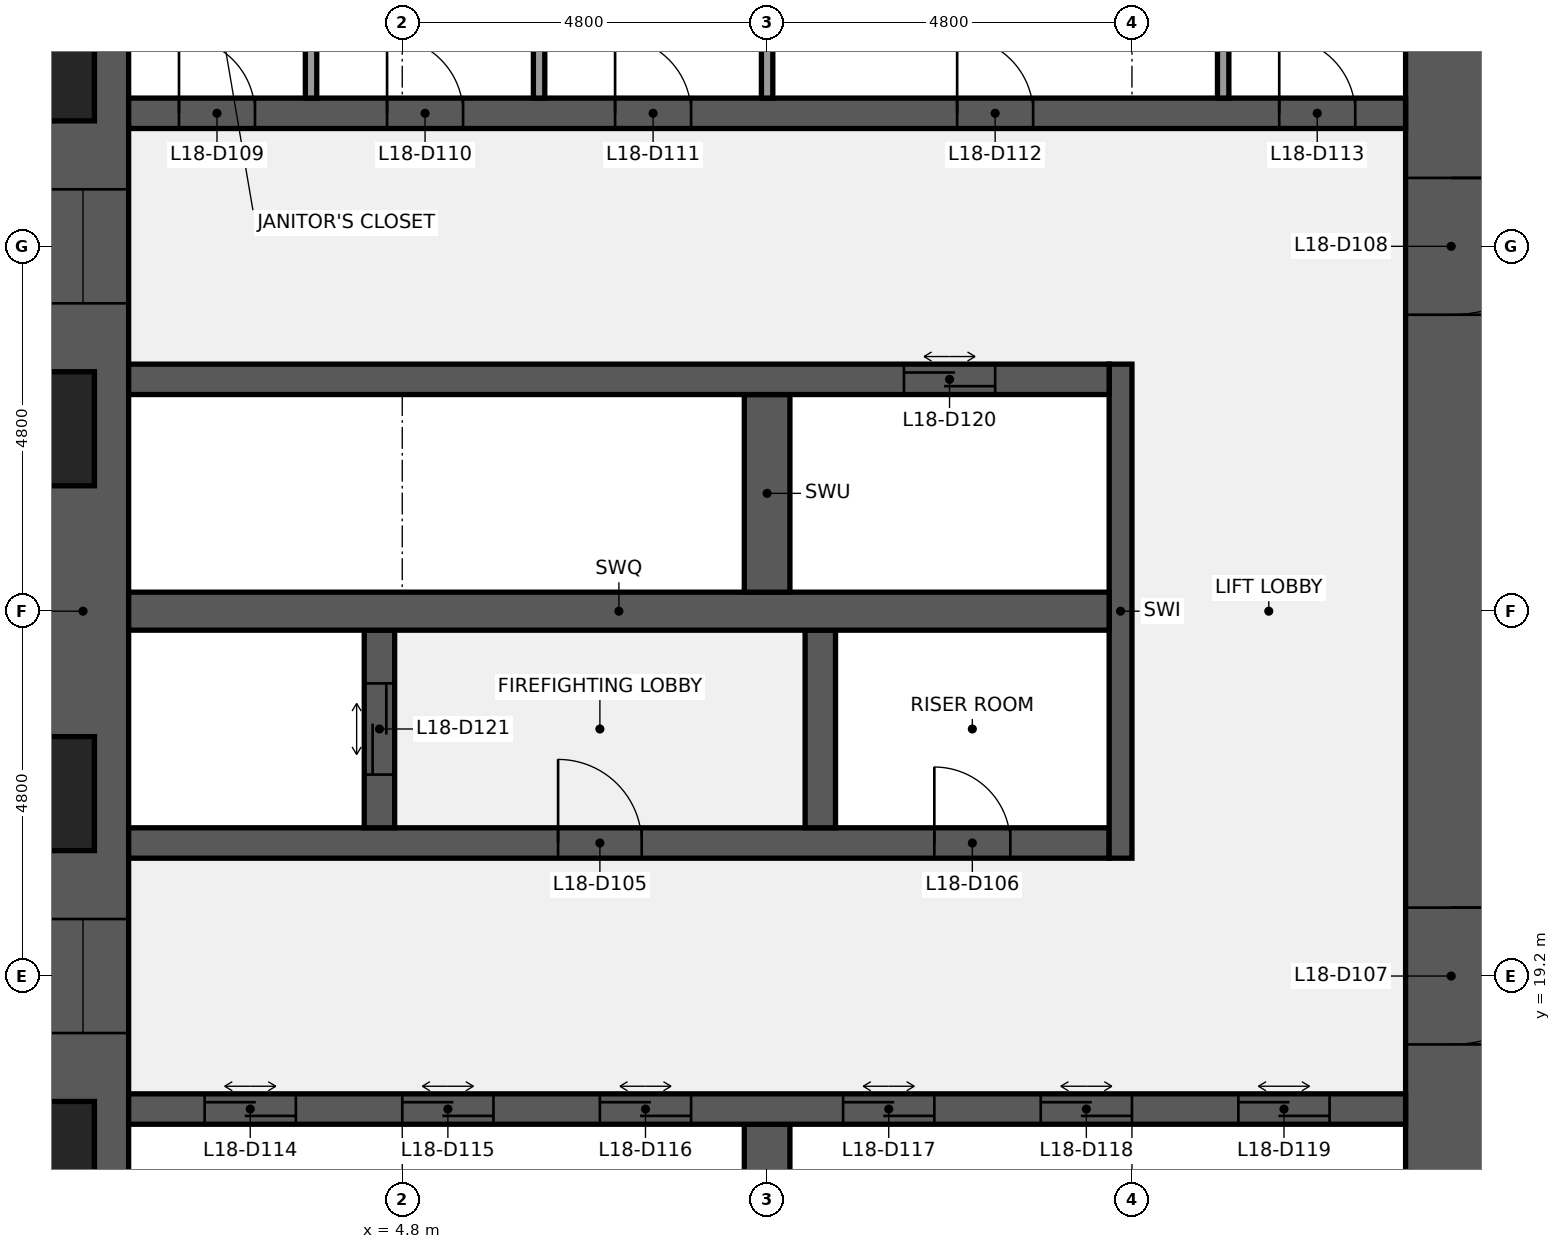
"""IFC4 building model, lengths in metres.
Left out: names, types, materials, properties, quantities, classifications, styles, units other than length and angle.
Written with IfcOpenShell. Run it as: python <this file> out.ifc"""

import sys

from ifc_helpers import new_model, si_unit, direction, frame, frame_2d, origin, place, context, subcontext, project, spatial, rectangle, extrude, element, fill, save


model = new_model("IFC4")
c1 = context("Model", 3, precision=1e-05, world=origin(), true_north=direction((0.0, 1.0)))
c2 = subcontext(c1, "Body", "Model", "MODEL_VIEW")
j1 = project(units=[si_unit("LENGTHUNIT", "METRE"), si_unit("PLANEANGLEUNIT", "RADIAN")], contexts=[c1])
p1 = place(None, origin())
s1 = spatial("IfcSite", under=j1, at=p1, CompositionType="ELEMENT")
p2 = place(p1, origin())
s2 = spatial("IfcBuilding", under=s1, at=p2, CompositionType="ELEMENT")
p3 = place(p2, frame((0.0, 0.0, 83.0)))
s3 = spatial("IfcBuildingStorey", under=s2, at=p3, CompositionType="ELEMENT", Elevation=83.0)
p4 = place(p3, frame((0.6, 9.6, 0.0), z_axis=(0.0, 0.0, 1.0), x_axis=(0.0, 1.0, 0.0)))
e1 = element("IfcWall", 1, at=p4, inside=s3, PredefinedType="SHEAR", context=c2, shape_type="SweptSolid", body=[
    extrude(rectangle(XDim=28.8, YDim=1.2, at=frame_2d((14.4, 0.0))), origin(), (0.0, 0.0, 1.0), 3.7),
])
p5 = place(p4, frame((8.85, 0.0, 0.9)))
e2 = element("IfcOpeningElement", 2, at=p5, cuts=e1, PredefinedType="OPENING", context=c2, shape_type="SweptSolid", body=[
    extrude(rectangle(XDim=1.5, YDim=1.5, at=frame_2d((0.75, 0.75))), frame((0.0, 0.61, 0.0), z_axis=(0.0, -1.0, 0.0), x_axis=(1.0, 0.0, 0.0)), (0.0, 0.0, 1.0), 1.22),
])
p6 = place(p4, frame((18.45, 0.0, 0.9)))
e3 = element("IfcOpeningElement", 3, at=p6, cuts=e1, PredefinedType="OPENING", context=c2, shape_type="SweptSolid", body=[
    extrude(rectangle(XDim=1.5, YDim=1.5, at=frame_2d((0.75, 0.75))), frame((0.0, 0.61, 0.0), z_axis=(0.0, -1.0, 0.0), x_axis=(1.0, 0.0, 0.0)), (0.0, 0.0, 1.0), 1.22),
])
p7 = place(p3, frame((18.6, 38.4, 0.0), z_axis=(0.0, 0.0, 1.0), x_axis=(0.0, -1.0, 0.0)))
e4 = element("IfcWall", 4, at=p7, inside=s3, PredefinedType="SHEAR", context=c2, shape_type="SweptSolid", body=[
    extrude(rectangle(XDim=28.8, YDim=1.2, at=frame_2d((14.4, 0.0))), origin(), (0.0, 0.0, 1.0), 3.7),
])
p8 = place(p7, frame((18.3, 0.0, 0.0)))
e5 = element("IfcOpeningElement", 5, at=p8, cuts=e4, PredefinedType="OPENING", context=c2, shape_type="SweptSolid", body=[
    extrude(rectangle(XDim=1.8, YDim=2.1, at=frame_2d((0.9, 1.05))), frame((0.0, 0.61, 0.0), z_axis=(0.0, -1.0, 0.0), x_axis=(1.0, 0.0, 0.0)), (0.0, 0.0, 1.0), 1.22),
])
p9 = place(p7, frame((8.7, 0.0, 0.0)))
e6 = element("IfcOpeningElement", 6, at=p9, cuts=e4, PredefinedType="OPENING", context=c2, shape_type="SweptSolid", body=[
    extrude(rectangle(XDim=1.8, YDim=2.1, at=frame_2d((0.9, 1.05))), frame((0.0, 0.61, 0.0), z_axis=(0.0, -1.0, 0.0), x_axis=(1.0, 0.0, 0.0)), (0.0, 0.0, 1.0), 1.22),
])
p10 = place(p3, frame((9.6, 14.65, 0.0), z_axis=(0.0, 0.0, 1.0), x_axis=(0.0, 1.0, 0.0)))
e7 = element("IfcWall", 7, at=p10, inside=s3, PredefinedType="SHEAR", context=c2, shape_type="SweptSolid", body=[
    extrude(rectangle(XDim=2.6, YDim=0.6, at=frame_2d((1.3, 0.0))), origin(), (0.0, 0.0, 1.0), 3.7),
])
p11 = place(p3, frame((1.2, 17.45, 0.0), z_axis=(0.0, 0.0, 1.0), x_axis=(1.0, 0.0, 0.0)))
e8 = element("IfcWall", 8, at=p11, inside=s3, PredefinedType="SHEAR", context=c2, shape_type="SweptSolid", body=[
    extrude(rectangle(XDim=16.8, YDim=0.4, at=frame_2d((8.4, 0.0))), origin(), (0.0, 0.0, 1.0), 3.7),
])
p12 = place(p11, frame((1.0, 0.0, 0.0)))
e9 = element("IfcOpeningElement", 9, at=p12, cuts=e8, PredefinedType="OPENING", context=c2, shape_type="SweptSolid", body=[
    extrude(rectangle(XDim=1.2, YDim=2.1, at=frame_2d((0.6, 1.05))), frame((0.0, 0.21, 0.0), z_axis=(0.0, -1.0, 0.0), x_axis=(1.0, 0.0, 0.0)), (0.0, 0.0, 1.0), 0.42),
])
p13 = place(p11, frame((3.6, 0.0, 0.0)))
e10 = element("IfcOpeningElement", 10, at=p13, cuts=e8, PredefinedType="OPENING", context=c2, shape_type="SweptSolid", body=[
    extrude(rectangle(XDim=1.2, YDim=2.1, at=frame_2d((0.6, 1.05))), frame((0.0, 0.21, 0.0), z_axis=(0.0, -1.0, 0.0), x_axis=(1.0, 0.0, 0.0)), (0.0, 0.0, 1.0), 0.42),
])
p14 = place(p11, frame((6.2, 0.0, 0.0)))
e11 = element("IfcOpeningElement", 11, at=p14, cuts=e8, PredefinedType="OPENING", context=c2, shape_type="SweptSolid", body=[
    extrude(rectangle(XDim=1.2, YDim=2.1, at=frame_2d((0.6, 1.05))), frame((0.0, 0.21, 0.0), z_axis=(0.0, -1.0, 0.0), x_axis=(1.0, 0.0, 0.0)), (0.0, 0.0, 1.0), 0.42),
])
p15 = place(p11, frame((9.4, 0.0, 0.0)))
e12 = element("IfcOpeningElement", 12, at=p15, cuts=e8, PredefinedType="OPENING", context=c2, shape_type="SweptSolid", body=[
    extrude(rectangle(XDim=1.2, YDim=2.1, at=frame_2d((0.6, 1.05))), frame((0.0, 0.21, 0.0), z_axis=(0.0, -1.0, 0.0), x_axis=(1.0, 0.0, 0.0)), (0.0, 0.0, 1.0), 0.42),
])
p16 = place(p11, frame((12.0, 0.0, 0.0)))
e13 = element("IfcOpeningElement", 13, at=p16, cuts=e8, PredefinedType="OPENING", context=c2, shape_type="SweptSolid", body=[
    extrude(rectangle(XDim=1.2, YDim=2.1, at=frame_2d((0.6, 1.05))), frame((0.0, 0.21, 0.0), z_axis=(0.0, -1.0, 0.0), x_axis=(1.0, 0.0, 0.0)), (0.0, 0.0, 1.0), 0.42),
])
p17 = place(p11, frame((14.6, 0.0, 0.0)))
e14 = element("IfcOpeningElement", 14, at=p17, cuts=e8, PredefinedType="OPENING", context=c2, shape_type="SweptSolid", body=[
    extrude(rectangle(XDim=1.2, YDim=2.1, at=frame_2d((0.6, 1.05))), frame((0.0, 0.21, 0.0), z_axis=(0.0, -1.0, 0.0), x_axis=(1.0, 0.0, 0.0)), (0.0, 0.0, 1.0), 0.42),
])
p18 = place(p3, frame((1.2, 20.95, 0.0), z_axis=(0.0, 0.0, 1.0), x_axis=(1.0, 0.0, 0.0)))
e15 = element("IfcWall", 15, at=p18, inside=s3, PredefinedType="SHEAR", context=c2, shape_type="SweptSolid", body=[
    extrude(rectangle(XDim=12.9, YDim=0.4, at=frame_2d((6.45, 0.0))), origin(), (0.0, 0.0, 1.0), 3.7),
])
p19 = place(p18, frame((5.65, 0.0, 0.0)))
e16 = element("IfcOpeningElement", 16, at=p19, cuts=e15, PredefinedType="OPENING", context=c2, shape_type="SweptSolid", body=[
    extrude(rectangle(XDim=1.1, YDim=2.1, at=frame_2d((0.55, 1.05))), frame((0.0, 0.21, 0.0), z_axis=(0.0, -1.0, 0.0), x_axis=(1.0, 0.0, 0.0)), (0.0, 0.0, 1.0), 0.42),
])
p20 = place(p18, frame((10.6, 0.0, 0.0)))
e17 = element("IfcOpeningElement", 17, at=p20, cuts=e15, PredefinedType="OPENING", context=c2, shape_type="SweptSolid", body=[
    extrude(rectangle(XDim=1.0, YDim=2.1, at=frame_2d((0.5, 1.05))), frame((0.0, 0.21, 0.0), z_axis=(0.0, -1.0, 0.0), x_axis=(1.0, 0.0, 0.0)), (0.0, 0.0, 1.0), 0.42),
])
p21 = place(p3, frame((14.25, 20.75, 0.0), z_axis=(0.0, 0.0, 1.0), x_axis=(0.0, 1.0, 0.0)))
e18 = element("IfcWall", 18, at=p21, inside=s3, PredefinedType="SHEAR", context=c2, shape_type="SweptSolid", body=[
    extrude(rectangle(XDim=6.5, YDim=0.3, at=frame_2d((3.25, 0.0))), origin(), (0.0, 0.0, 1.0), 3.7),
])
p22 = place(p3, frame((4.5, 21.15, 0.0), z_axis=(0.0, 0.0, 1.0), x_axis=(0.0, 1.0, 0.0)))
e19 = element("IfcWall", 19, at=p22, inside=s3, PredefinedType="SHEAR", context=c2, shape_type="SweptSolid", body=[
    extrude(rectangle(XDim=2.6, YDim=0.4, at=frame_2d((1.3, 0.0))), origin(), (0.0, 0.0, 1.0), 3.7),
])
p23 = place(p22, frame((0.7, 0.0, 0.0)))
e20 = element("IfcOpeningElement", 20, at=p23, cuts=e19, PredefinedType="OPENING", context=c2, shape_type="SweptSolid", body=[
    extrude(rectangle(XDim=1.2, YDim=2.1, at=frame_2d((0.6, 1.05))), frame((0.0, 0.21, 0.0), z_axis=(0.0, -1.0, 0.0), x_axis=(1.0, 0.0, 0.0)), (0.0, 0.0, 1.0), 0.42),
])
p24 = place(p3, frame((10.3, 21.15, 0.0), z_axis=(0.0, 0.0, 1.0), x_axis=(0.0, 1.0, 0.0)))
e21 = element("IfcWall", 21, at=p24, inside=s3, PredefinedType="SHEAR", context=c2, shape_type="SweptSolid", body=[
    extrude(rectangle(XDim=2.6, YDim=0.4, at=frame_2d((1.3, 0.0))), origin(), (0.0, 0.0, 1.0), 3.7),
])
p25 = place(p3, frame((1.2, 24.0, 0.0), z_axis=(0.0, 0.0, 1.0), x_axis=(1.0, 0.0, 0.0)))
e22 = element("IfcWall", 22, at=p25, inside=s3, PredefinedType="SHEAR", context=c2, shape_type="SweptSolid", body=[
    extrude(rectangle(XDim=12.9, YDim=0.5, at=frame_2d((6.45, 0.0))), origin(), (0.0, 0.0, 1.0), 3.7),
])
p26 = place(p3, frame((9.6, 24.25, 0.0), z_axis=(0.0, 0.0, 1.0), x_axis=(0.0, 1.0, 0.0)))
e23 = element("IfcWall", 23, at=p26, inside=s3, PredefinedType="SHEAR", context=c2, shape_type="SweptSolid", body=[
    extrude(rectangle(XDim=2.6, YDim=0.6, at=frame_2d((1.3, 0.0))), origin(), (0.0, 0.0, 1.0), 3.7),
])
p27 = place(p3, frame((1.2, 27.05, 0.0), z_axis=(0.0, 0.0, 1.0), x_axis=(1.0, 0.0, 0.0)))
e24 = element("IfcWall", 24, at=p27, inside=s3, PredefinedType="SHEAR", context=c2, shape_type="SweptSolid", body=[
    extrude(rectangle(XDim=12.9, YDim=0.4, at=frame_2d((6.45, 0.0))), origin(), (0.0, 0.0, 1.0), 3.7),
])
p28 = place(p27, frame((10.2, 0.0, 0.0)))
e25 = element("IfcOpeningElement", 25, at=p28, cuts=e24, PredefinedType="OPENING", context=c2, shape_type="SweptSolid", body=[
    extrude(rectangle(XDim=1.2, YDim=2.1, at=frame_2d((0.6, 1.05))), frame((0.0, 0.21, 0.0), z_axis=(0.0, -1.0, 0.0), x_axis=(1.0, 0.0, 0.0)), (0.0, 0.0, 1.0), 0.42),
])
p29 = place(p3, frame((1.2, 30.55, 0.0), z_axis=(0.0, 0.0, 1.0), x_axis=(1.0, 0.0, 0.0)))
e26 = element("IfcWall", 26, at=p29, inside=s3, PredefinedType="SHEAR", context=c2, shape_type="SweptSolid", body=[
    extrude(rectangle(XDim=16.8, YDim=0.4, at=frame_2d((8.4, 0.0))), origin(), (0.0, 0.0, 1.0), 3.7),
])
p30 = place(p29, frame((0.663, 0.0, 0.0)))
e27 = element("IfcOpeningElement", 27, at=p30, cuts=e26, PredefinedType="OPENING", context=c2, shape_type="SweptSolid", body=[
    extrude(rectangle(XDim=1.0, YDim=2.1, at=frame_2d((0.5, 1.05))), frame((0.0, 0.21, 0.0), z_axis=(0.0, -1.0, 0.0), x_axis=(1.0, 0.0, 0.0)), (0.0, 0.0, 1.0), 0.42),
])
p31 = place(p29, frame((3.4, 0.0, 0.0)))
e28 = element("IfcOpeningElement", 28, at=p31, cuts=e26, PredefinedType="OPENING", context=c2, shape_type="SweptSolid", body=[
    extrude(rectangle(XDim=1.0, YDim=2.1, at=frame_2d((0.5, 1.05))), frame((0.0, 0.21, 0.0), z_axis=(0.0, -1.0, 0.0), x_axis=(1.0, 0.0, 0.0)), (0.0, 0.0, 1.0), 0.42),
])
p32 = place(p29, frame((6.4, 0.0, 0.0)))
e29 = element("IfcOpeningElement", 29, at=p32, cuts=e26, PredefinedType="OPENING", context=c2, shape_type="SweptSolid", body=[
    extrude(rectangle(XDim=1.0, YDim=2.1, at=frame_2d((0.5, 1.05))), frame((0.0, 0.21, 0.0), z_axis=(0.0, -1.0, 0.0), x_axis=(1.0, 0.0, 0.0)), (0.0, 0.0, 1.0), 0.42),
])
p33 = place(p29, frame((10.9, 0.0, 0.0)))
e30 = element("IfcOpeningElement", 30, at=p33, cuts=e26, PredefinedType="OPENING", context=c2, shape_type="SweptSolid", body=[
    extrude(rectangle(XDim=1.0, YDim=2.1, at=frame_2d((0.5, 1.05))), frame((0.0, 0.21, 0.0), z_axis=(0.0, -1.0, 0.0), x_axis=(1.0, 0.0, 0.0)), (0.0, 0.0, 1.0), 0.42),
])
p34 = place(p29, frame((15.137, 0.0, 0.0)))
e31 = element("IfcOpeningElement", 31, at=p34, cuts=e26, PredefinedType="OPENING", context=c2, shape_type="SweptSolid", body=[
    extrude(rectangle(XDim=1.0, YDim=2.1, at=frame_2d((0.5, 1.05))), frame((0.0, 0.21, 0.0), z_axis=(0.0, -1.0, 0.0), x_axis=(1.0, 0.0, 0.0)), (0.0, 0.0, 1.0), 0.42),
])
for number, where, z_axis, x_axis in (
    (32, (3.6, 30.75, 0.0), (0.0, 0.0, 1.0), (0.0, 1.0, 0.0)),
    (33, (6.6, 30.75, 0.0), (0.0, 0.0, 1.0), (0.0, 1.0, 0.0)),
    (34, (9.6, 30.75, 0.0), (0.0, 0.0, 1.0), (0.0, 1.0, 0.0)),
    (35, (15.6, 30.75, 0.0), (0.0, 0.0, 1.0), (0.0, 1.0, 0.0)),
):
    element("IfcWall", number, at=place(p3, frame(where, z_axis=z_axis, x_axis=x_axis)), inside=s3, PredefinedType="PARTITIONING", context=c2, shape_type="SweptSolid", body=[
        extrude(rectangle(XDim=2.6, YDim=0.15, at=frame_2d((1.3, 0.0))), origin(), (0.0, 0.0, 1.0), 3.7),
    ])
p35 = place(p19, origin())
e36 = element("IfcDoor", 36, at=p35, inside=s3, OperationType="SINGLE_SWING_LEFT", PredefinedType="DOOR", context=c2, shape_type="SweptSolid", body=[
    extrude(rectangle(XDim=1.1, YDim=2.1, at=frame_2d((0.55, 1.05))), frame((0.0, 0.025, 0.0), z_axis=(0.0, -1.0, 0.0), x_axis=(1.0, 0.0, 0.0)), (0.0, 0.0, 1.0), 0.05),
])
fill(e16, e36)
p36 = place(p20, origin())
e37 = element("IfcDoor", 37, at=p36, inside=s3, OperationType="SINGLE_SWING_LEFT", PredefinedType="DOOR", context=c2, shape_type="SweptSolid", body=[
    extrude(rectangle(XDim=1.0, YDim=2.1, at=frame_2d((0.5, 1.05))), frame((0.0, 0.025, 0.0), z_axis=(0.0, -1.0, 0.0), x_axis=(1.0, 0.0, 0.0)), (0.0, 0.0, 1.0), 0.05),
])
fill(e17, e37)
p37 = place(p8, origin())
e38 = element("IfcDoor", 38, at=p37, inside=s3, OperationType="DOUBLE_DOOR_SINGLE_SWING", PredefinedType="DOOR", context=c2, shape_type="SweptSolid", body=[
    extrude(rectangle(XDim=1.8, YDim=2.1, at=frame_2d((0.9, 1.05))), frame((0.0, 0.025, 0.0), z_axis=(0.0, -1.0, 0.0), x_axis=(1.0, 0.0, 0.0)), (0.0, 0.0, 1.0), 0.05),
])
fill(e5, e38)
p38 = place(p9, origin())
e39 = element("IfcDoor", 39, at=p38, inside=s3, OperationType="DOUBLE_DOOR_SINGLE_SWING", PredefinedType="DOOR", context=c2, shape_type="SweptSolid", body=[
    extrude(rectangle(XDim=1.8, YDim=2.1, at=frame_2d((0.9, 1.05))), frame((0.0, 0.025, 0.0), z_axis=(0.0, -1.0, 0.0), x_axis=(1.0, 0.0, 0.0)), (0.0, 0.0, 1.0), 0.05),
])
fill(e6, e39)
p39 = place(p30, origin())
e40 = element("IfcDoor", 40, at=p39, inside=s3, OperationType="SINGLE_SWING_LEFT", PredefinedType="DOOR", context=c2, shape_type="SweptSolid", body=[
    extrude(rectangle(XDim=1.0, YDim=2.1, at=frame_2d((0.5, 1.05))), frame((0.0, 0.025, 0.0), z_axis=(0.0, -1.0, 0.0), x_axis=(1.0, 0.0, 0.0)), (0.0, 0.0, 1.0), 0.05),
])
fill(e27, e40)
p40 = place(p31, origin())
e41 = element("IfcDoor", 41, at=p40, inside=s3, OperationType="SINGLE_SWING_LEFT", PredefinedType="DOOR", context=c2, shape_type="SweptSolid", body=[
    extrude(rectangle(XDim=1.0, YDim=2.1, at=frame_2d((0.5, 1.05))), frame((0.0, 0.025, 0.0), z_axis=(0.0, -1.0, 0.0), x_axis=(1.0, 0.0, 0.0)), (0.0, 0.0, 1.0), 0.05),
])
fill(e28, e41)
p41 = place(p32, origin())
e42 = element("IfcDoor", 42, at=p41, inside=s3, OperationType="SINGLE_SWING_LEFT", PredefinedType="DOOR", context=c2, shape_type="SweptSolid", body=[
    extrude(rectangle(XDim=1.0, YDim=2.1, at=frame_2d((0.5, 1.05))), frame((0.0, 0.025, 0.0), z_axis=(0.0, -1.0, 0.0), x_axis=(1.0, 0.0, 0.0)), (0.0, 0.0, 1.0), 0.05),
])
fill(e29, e42)
p42 = place(p33, origin())
e43 = element("IfcDoor", 43, at=p42, inside=s3, OperationType="SINGLE_SWING_LEFT", PredefinedType="DOOR", context=c2, shape_type="SweptSolid", body=[
    extrude(rectangle(XDim=1.0, YDim=2.1, at=frame_2d((0.5, 1.05))), frame((0.0, 0.025, 0.0), z_axis=(0.0, -1.0, 0.0), x_axis=(1.0, 0.0, 0.0)), (0.0, 0.0, 1.0), 0.05),
])
fill(e30, e43)
p43 = place(p34, origin())
e44 = element("IfcDoor", 44, at=p43, inside=s3, OperationType="SINGLE_SWING_LEFT", PredefinedType="DOOR", context=c2, shape_type="SweptSolid", body=[
    extrude(rectangle(XDim=1.0, YDim=2.1, at=frame_2d((0.5, 1.05))), frame((0.0, 0.025, 0.0), z_axis=(0.0, -1.0, 0.0), x_axis=(1.0, 0.0, 0.0)), (0.0, 0.0, 1.0), 0.05),
])
fill(e31, e44)
p44 = place(p12, origin())
e45 = element("IfcDoor", 45, at=p44, inside=s3, OperationType="DOUBLE_DOOR_SLIDING", PredefinedType="DOOR", context=c2, shape_type="SweptSolid", body=[
    extrude(rectangle(XDim=1.2, YDim=2.1, at=frame_2d((0.6, 1.05))), frame((0.0, 0.025, 0.0), z_axis=(0.0, -1.0, 0.0), x_axis=(1.0, 0.0, 0.0)), (0.0, 0.0, 1.0), 0.05),
])
fill(e9, e45)
p45 = place(p13, origin())
e46 = element("IfcDoor", 46, at=p45, inside=s3, OperationType="DOUBLE_DOOR_SLIDING", PredefinedType="DOOR", context=c2, shape_type="SweptSolid", body=[
    extrude(rectangle(XDim=1.2, YDim=2.1, at=frame_2d((0.6, 1.05))), frame((0.0, 0.025, 0.0), z_axis=(0.0, -1.0, 0.0), x_axis=(1.0, 0.0, 0.0)), (0.0, 0.0, 1.0), 0.05),
])
fill(e10, e46)
p46 = place(p14, origin())
e47 = element("IfcDoor", 47, at=p46, inside=s3, OperationType="DOUBLE_DOOR_SLIDING", PredefinedType="DOOR", context=c2, shape_type="SweptSolid", body=[
    extrude(rectangle(XDim=1.2, YDim=2.1, at=frame_2d((0.6, 1.05))), frame((0.0, 0.025, 0.0), z_axis=(0.0, -1.0, 0.0), x_axis=(1.0, 0.0, 0.0)), (0.0, 0.0, 1.0), 0.05),
])
fill(e11, e47)
p47 = place(p15, origin())
e48 = element("IfcDoor", 48, at=p47, inside=s3, OperationType="DOUBLE_DOOR_SLIDING", PredefinedType="DOOR", context=c2, shape_type="SweptSolid", body=[
    extrude(rectangle(XDim=1.2, YDim=2.1, at=frame_2d((0.6, 1.05))), frame((0.0, 0.025, 0.0), z_axis=(0.0, -1.0, 0.0), x_axis=(1.0, 0.0, 0.0)), (0.0, 0.0, 1.0), 0.05),
])
fill(e12, e48)
p48 = place(p16, origin())
e49 = element("IfcDoor", 49, at=p48, inside=s3, OperationType="DOUBLE_DOOR_SLIDING", PredefinedType="DOOR", context=c2, shape_type="SweptSolid", body=[
    extrude(rectangle(XDim=1.2, YDim=2.1, at=frame_2d((0.6, 1.05))), frame((0.0, 0.025, 0.0), z_axis=(0.0, -1.0, 0.0), x_axis=(1.0, 0.0, 0.0)), (0.0, 0.0, 1.0), 0.05),
])
fill(e13, e49)
p49 = place(p17, origin())
e50 = element("IfcDoor", 50, at=p49, inside=s3, OperationType="DOUBLE_DOOR_SLIDING", PredefinedType="DOOR", context=c2, shape_type="SweptSolid", body=[
    extrude(rectangle(XDim=1.2, YDim=2.1, at=frame_2d((0.6, 1.05))), frame((0.0, 0.025, 0.0), z_axis=(0.0, -1.0, 0.0), x_axis=(1.0, 0.0, 0.0)), (0.0, 0.0, 1.0), 0.05),
])
fill(e14, e50)
p50 = place(p28, origin())
e51 = element("IfcDoor", 51, at=p50, inside=s3, OperationType="DOUBLE_DOOR_SLIDING", PredefinedType="DOOR", context=c2, shape_type="SweptSolid", body=[
    extrude(rectangle(XDim=1.2, YDim=2.1, at=frame_2d((0.6, 1.05))), frame((0.0, 0.025, 0.0), z_axis=(0.0, -1.0, 0.0), x_axis=(1.0, 0.0, 0.0)), (0.0, 0.0, 1.0), 0.05),
])
fill(e25, e51)
p51 = place(p23, origin())
e52 = element("IfcDoor", 52, at=p51, inside=s3, OperationType="DOUBLE_DOOR_SLIDING", PredefinedType="DOOR", context=c2, shape_type="SweptSolid", body=[
    extrude(rectangle(XDim=1.2, YDim=2.1, at=frame_2d((0.6, 1.05))), frame((0.0, 0.025, 0.0), z_axis=(0.0, -1.0, 0.0), x_axis=(1.0, 0.0, 0.0)), (0.0, 0.0, 1.0), 0.05),
])
fill(e20, e52)
p52 = place(p5, origin())
e53 = element("IfcWindow", 53, at=p52, inside=s3, PartitioningType="SINGLE_PANEL", PredefinedType="WINDOW", context=c2, shape_type="SweptSolid", body=[
    extrude(rectangle(XDim=1.5, YDim=1.5, at=frame_2d((0.75, 0.75))), frame((0.0, 0.03, 0.0), z_axis=(0.0, -1.0, 0.0), x_axis=(1.0, 0.0, 0.0)), (0.0, 0.0, 1.0), 0.06),
])
fill(e2, e53)
p53 = place(p6, origin())
e54 = element("IfcWindow", 54, at=p53, inside=s3, PartitioningType="SINGLE_PANEL", PredefinedType="WINDOW", context=c2, shape_type="SweptSolid", body=[
    extrude(rectangle(XDim=1.5, YDim=1.5, at=frame_2d((0.75, 0.75))), frame((0.0, 0.03, 0.0), z_axis=(0.0, -1.0, 0.0), x_axis=(1.0, 0.0, 0.0)), (0.0, 0.0, 1.0), 0.06),
])
fill(e3, e54)
save(model, sys.argv[1])
